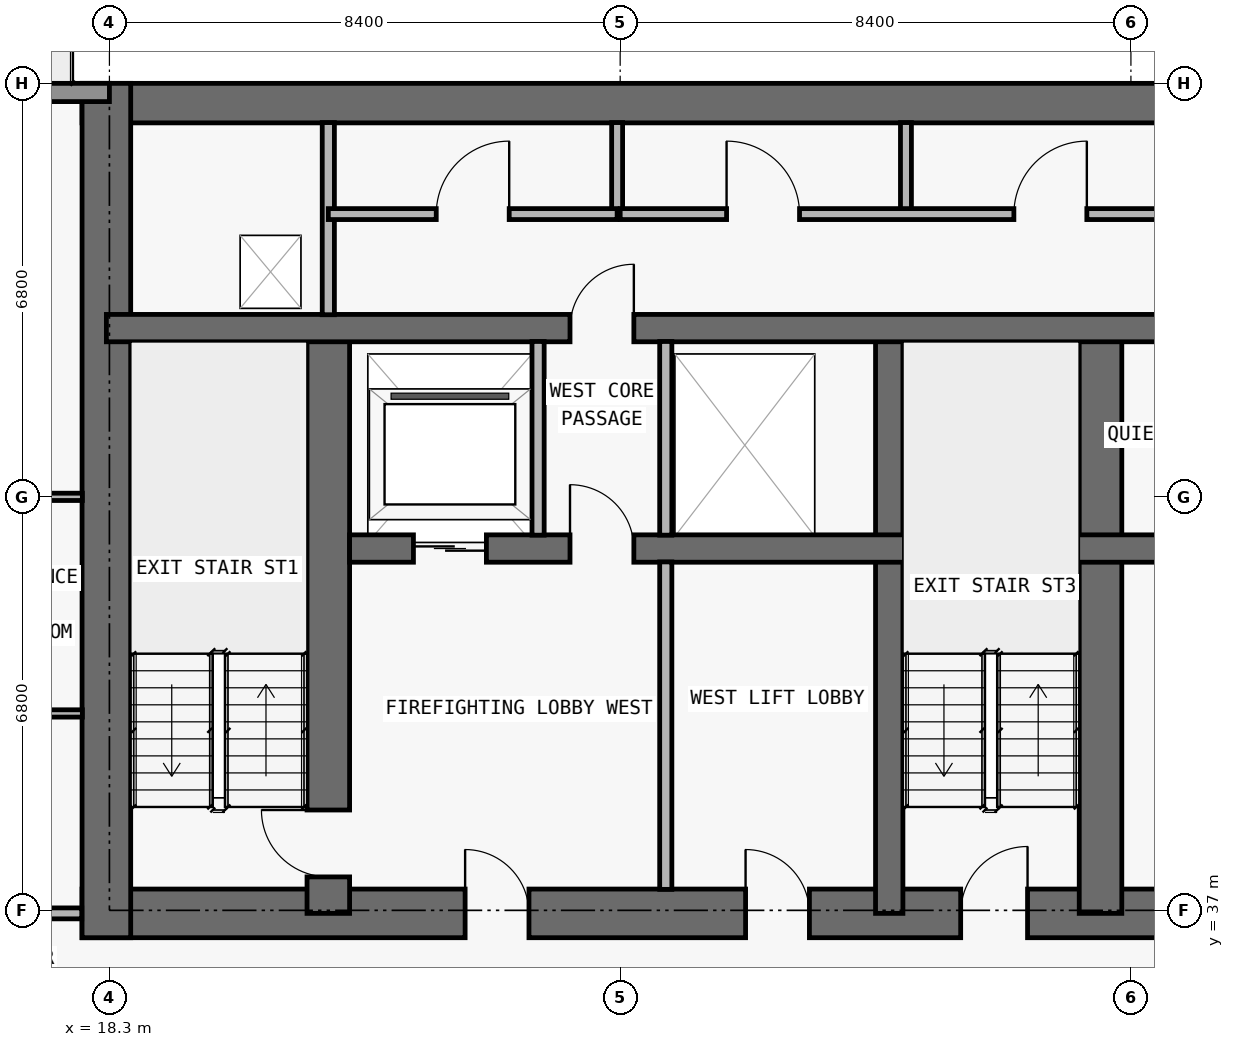
"""IFC4 building model, lengths in metres.
Left out: names, types, materials, properties, quantities, classifications, styles, units other than length and angle.
Written with IfcOpenShell. Run it as: python <this file> out.ifc"""

import sys

from ifc_helpers import new_model, si_unit, direction, frame, frame_2d, origin, place, context, subcontext, project, spatial, rectangle, extrude, element, fill, save


model = new_model("IFC4")
c1 = context("Model", 3, precision=1e-05, world=origin(), true_north=direction((0.0, 1.0)))
c2 = subcontext(c1, "Body", "Model", "MODEL_VIEW")
j1 = project(units=[si_unit("LENGTHUNIT", "METRE"), si_unit("PLANEANGLEUNIT", "RADIAN")], contexts=[c1])
p1 = place(None, origin())
s1 = spatial("IfcSite", under=j1, at=p1, CompositionType="ELEMENT")
p2 = place(p1, origin())
s2 = spatial("IfcBuilding", under=s1, at=p2, CompositionType="ELEMENT")
p3 = place(p2, frame((0.0, 0.0, 125.7)))
s3 = spatial("IfcBuildingStorey", under=s2, at=p3, CompositionType="ELEMENT", Elevation=125.7)
p4 = place(p3, frame((17.85, 36.95, 0.0), z_axis=(0.0, 0.0, 1.0), x_axis=(1.0, 0.0, 0.0)))
e1 = element("IfcWall", 1, at=p4, inside=s3, PredefinedType="SHEAR", context=c2, shape_type="SweptSolid", body=[
    extrude(rectangle(XDim=42.1, YDim=0.8, at=frame_2d((21.05, 0.0))), origin(), (0.0, 0.0, 1.0), 3.05),
])
p5 = place(p4, frame((14.45, 0.0, 0.0)))
e2 = element("IfcOpeningElement", 2, at=p5, cuts=e1, PredefinedType="OPENING", context=c2, shape_type="SweptSolid", body=[
    extrude(rectangle(XDim=1.1, YDim=2.15, at=frame_2d((0.55, 1.075))), frame((0.0, 0.41, 0.0), z_axis=(0.0, -1.0, 0.0), x_axis=(1.0, 0.0, 0.0)), (0.0, 0.0, 1.0), 0.82),
])
p6 = place(p4, frame((6.3, 0.0, 0.0)))
e3 = element("IfcOpeningElement", 3, at=p6, cuts=e1, PredefinedType="OPENING", context=c2, shape_type="SweptSolid", body=[
    extrude(rectangle(XDim=1.05, YDim=2.15, at=frame_2d((0.525, 1.075))), frame((0.0, 0.41, 0.0), z_axis=(0.0, -1.0, 0.0), x_axis=(1.0, 0.0, 0.0)), (0.0, 0.0, 1.0), 0.82),
])
p7 = place(p4, frame((34.8, 0.0, 0.0)))
e4 = element("IfcOpeningElement", 4, at=p7, cuts=e1, PredefinedType="OPENING", context=c2, shape_type="SweptSolid", body=[
    extrude(rectangle(XDim=1.05, YDim=2.15, at=frame_2d((0.525, 1.075))), frame((0.0, 0.41, 0.0), z_axis=(0.0, -1.0, 0.0), x_axis=(1.0, 0.0, 0.0)), (0.0, 0.0, 1.0), 0.82),
])
p8 = place(p4, frame((10.913, 0.0, 0.0)))
e5 = element("IfcOpeningElement", 5, at=p8, cuts=e1, PredefinedType="OPENING", context=c2, shape_type="SweptSolid", body=[
    extrude(rectangle(XDim=1.05, YDim=2.15, at=frame_2d((0.525, 1.075))), frame((0.0, 0.41, 0.0), z_axis=(0.0, -1.0, 0.0), x_axis=(1.0, 0.0, 0.0)), (0.0, 0.0, 1.0), 0.82),
])
p9 = place(p4, frame((24.15, 0.0, 0.0)))
e6 = element("IfcOpeningElement", 6, at=p9, cuts=e1, PredefinedType="OPENING", context=c2, shape_type="SweptSolid", body=[
    extrude(rectangle(XDim=1.05, YDim=2.15, at=frame_2d((0.525, 1.075))), frame((0.0, 0.41, 0.0), z_axis=(0.0, -1.0, 0.0), x_axis=(1.0, 0.0, 0.0)), (0.0, 0.0, 1.0), 0.82),
])
p10 = place(p3, frame((17.85, 50.275, 0.0), z_axis=(0.0, 0.0, 1.0), x_axis=(1.0, 0.0, 0.0)))
e7 = element("IfcWall", 7, at=p10, inside=s3, PredefinedType="SHEAR", context=c2, shape_type="SweptSolid", body=[
    extrude(rectangle(XDim=42.1, YDim=0.65, at=frame_2d((21.05, 0.0))), origin(), (0.0, 0.0, 1.0), 3.05),
])
p11 = place(p3, frame((18.25, 36.55, 0.0), z_axis=(0.0, 0.0, 1.0), x_axis=(0.0, 1.0, 0.0)))
e8 = element("IfcWall", 8, at=p11, inside=s3, PredefinedType="SHEAR", context=c2, shape_type="SweptSolid", body=[
    extrude(rectangle(XDim=14.05, YDim=0.8, at=frame_2d((7.025, 0.0))), origin(), (0.0, 0.0, 1.0), 3.05),
])
p12 = place(p3, frame((21.9, 36.95, 0.0), z_axis=(0.0, 0.0, 1.0), x_axis=(0.0, 1.0, 0.0)))
e9 = element("IfcWall", 9, at=p12, inside=s3, PredefinedType="SHEAR", context=c2, shape_type="SweptSolid", body=[
    extrude(rectangle(XDim=9.625, YDim=0.7, at=frame_2d((4.812, 0.0))), origin(), (0.0, 0.0, 1.0), 3.05),
])
p13 = place(p12, frame((0.6, 0.0, 0.0)))
e10 = element("IfcOpeningElement", 10, at=p13, cuts=e9, PredefinedType="OPENING", context=c2, shape_type="SweptSolid", body=[
    extrude(rectangle(XDim=1.1, YDim=2.15, at=frame_2d((0.55, 1.075))), frame((0.0, 0.36, 0.0), z_axis=(0.0, -1.0, 0.0), x_axis=(1.0, 0.0, 0.0)), (0.0, 0.0, 1.0), 0.72),
])
p14 = place(p3, frame((31.125, 36.95, 0.0), z_axis=(0.0, 0.0, 1.0), x_axis=(0.0, 1.0, 0.0)))
e11 = element("IfcWall", 11, at=p14, inside=s3, PredefinedType="SHEAR", context=c2, shape_type="SweptSolid", body=[
    extrude(rectangle(XDim=9.625, YDim=0.45, at=frame_2d((4.812, 0.0))), origin(), (0.0, 0.0, 1.0), 3.05),
])
p15 = place(p3, frame((34.6, 36.95, 0.0), z_axis=(0.0, 0.0, 1.0), x_axis=(0.0, 1.0, 0.0)))
e12 = element("IfcWall", 12, at=p15, inside=s3, PredefinedType="SHEAR", context=c2, shape_type="SweptSolid", body=[
    extrude(rectangle(XDim=9.625, YDim=0.7, at=frame_2d((4.812, 0.0))), origin(), (0.0, 0.0, 1.0), 3.05),
])
p16 = place(p3, frame((22.25, 42.95, 0.0), z_axis=(0.0, 0.0, 1.0), x_axis=(1.0, 0.0, 0.0)))
e13 = element("IfcWall", 13, at=p16, inside=s3, PredefinedType="SHEAR", context=c2, shape_type="SweptSolid", body=[
    extrude(rectangle(XDim=33.3, YDim=0.45, at=frame_2d((16.65, 0.0))), origin(), (0.0, 0.0, 1.0), 3.05),
])
p17 = place(p16, frame((1.05, 0.0, 0.0)))
e14 = element("IfcOpeningElement", 14, at=p17, cuts=e13, PredefinedType="OPENING", context=c2, shape_type="SweptSolid", body=[
    extrude(rectangle(XDim=1.2, YDim=2.2, at=frame_2d((0.6, 1.1))), frame((0.0, 0.235, 0.0), z_axis=(0.0, -1.0, 0.0), x_axis=(1.0, 0.0, 0.0)), (0.0, 0.0, 1.0), 0.47),
])
p18 = place(p16, frame((31.05, 0.0, 0.0)))
e15 = element("IfcOpeningElement", 15, at=p18, cuts=e13, PredefinedType="OPENING", context=c2, shape_type="SweptSolid", body=[
    extrude(rectangle(XDim=1.2, YDim=2.2, at=frame_2d((0.6, 1.1))), frame((0.0, 0.235, 0.0), z_axis=(0.0, -1.0, 0.0), x_axis=(1.0, 0.0, 0.0)), (0.0, 0.0, 1.0), 0.47),
])
p19 = place(p16, frame((21.4, 0.0, 0.0)))
e16 = element("IfcOpeningElement", 16, at=p19, cuts=e13, PredefinedType="OPENING", context=c2, shape_type="SweptSolid", body=[
    extrude(rectangle(XDim=1.1, YDim=2.2, at=frame_2d((0.55, 1.1))), frame((0.0, 0.235, 0.0), z_axis=(0.0, -1.0, 0.0), x_axis=(1.0, 0.0, 0.0)), (0.0, 0.0, 1.0), 0.47),
])
p20 = place(p16, frame((24.0, 0.0, 0.0)))
e17 = element("IfcOpeningElement", 17, at=p20, cuts=e13, PredefinedType="OPENING", context=c2, shape_type="SweptSolid", body=[
    extrude(rectangle(XDim=1.1, YDim=2.2, at=frame_2d((0.55, 1.1))), frame((0.0, 0.235, 0.0), z_axis=(0.0, -1.0, 0.0), x_axis=(1.0, 0.0, 0.0)), (0.0, 0.0, 1.0), 0.47),
])
p21 = place(p16, frame((3.625, 0.0, 0.0)))
e18 = element("IfcOpeningElement", 18, at=p21, cuts=e13, PredefinedType="OPENING", context=c2, shape_type="SweptSolid", body=[
    extrude(rectangle(XDim=1.05, YDim=2.15, at=frame_2d((0.525, 1.075))), frame((0.0, 0.235, 0.0), z_axis=(0.0, -1.0, 0.0), x_axis=(1.0, 0.0, 0.0)), (0.0, 0.0, 1.0), 0.47),
])
p22 = place(p16, frame((28.675, 0.0, 0.0)))
e19 = element("IfcOpeningElement", 19, at=p22, cuts=e13, PredefinedType="OPENING", context=c2, shape_type="SweptSolid", body=[
    extrude(rectangle(XDim=1.05, YDim=2.15, at=frame_2d((0.525, 1.075))), frame((0.0, 0.235, 0.0), z_axis=(0.0, -1.0, 0.0), x_axis=(1.0, 0.0, 0.0)), (0.0, 0.0, 1.0), 0.47),
])
p23 = place(p16, frame((15.975, 0.0, 0.0)))
e20 = element("IfcOpeningElement", 20, at=p23, cuts=e13, PredefinedType="OPENING", context=c2, shape_type="SweptSolid", body=[
    extrude(rectangle(XDim=1.0, YDim=2.2, at=frame_2d((0.5, 1.1))), frame((0.0, 0.235, 0.0), z_axis=(0.0, -1.0, 0.0), x_axis=(1.0, 0.0, 0.0)), (0.0, 0.0, 1.0), 0.47),
])
p24 = place(p3, frame((18.25, 46.575, 0.0), z_axis=(0.0, 0.0, 1.0), x_axis=(1.0, 0.0, 0.0)))
e21 = element("IfcWall", 21, at=p24, inside=s3, PredefinedType="SHEAR", context=c2, shape_type="SweptSolid", body=[
    extrude(rectangle(XDim=41.3, YDim=0.45, at=frame_2d((20.65, 0.0))), origin(), (0.0, 0.0, 1.0), 3.05),
])
p25 = place(p24, frame((7.625, 0.0, 0.0)))
e22 = element("IfcOpeningElement", 22, at=p25, cuts=e21, PredefinedType="OPENING", context=c2, shape_type="SweptSolid", body=[
    extrude(rectangle(XDim=1.05, YDim=2.15, at=frame_2d((0.525, 1.075))), frame((0.0, 0.235, 0.0), z_axis=(0.0, -1.0, 0.0), x_axis=(1.0, 0.0, 0.0)), (0.0, 0.0, 1.0), 0.47),
])
p26 = place(p24, frame((32.675, 0.0, 0.0)))
e23 = element("IfcOpeningElement", 23, at=p26, cuts=e21, PredefinedType="OPENING", context=c2, shape_type="SweptSolid", body=[
    extrude(rectangle(XDim=1.05, YDim=2.15, at=frame_2d((0.525, 1.075))), frame((0.0, 0.235, 0.0), z_axis=(0.0, -1.0, 0.0), x_axis=(1.0, 0.0, 0.0)), (0.0, 0.0, 1.0), 0.47),
])
p27 = place(p3, frame((7.7, 50.45, 0.0), z_axis=(0.0, 0.0, 1.0), x_axis=(1.0, 0.0, 0.0)))
e24 = element("IfcWall", 24, at=p27, inside=s3, PredefinedType="STANDARD", context=c2, shape_type="SweptSolid", body=[
    extrude(rectangle(XDim=10.6, YDim=0.3, at=frame_2d((5.3, 0.0))), origin(), (0.0, 0.0, 1.0), 3.05),
])
p28 = place(p27, frame((4.3, 0.0, 0.0)))
e25 = element("IfcOpeningElement", 25, at=p28, cuts=e24, PredefinedType="OPENING", context=c2, shape_type="SweptSolid", body=[
    extrude(rectangle(XDim=2.0, YDim=2.3, at=frame_2d((1.0, 1.15))), frame((0.0, 0.16, 0.0), z_axis=(0.0, -1.0, 0.0), x_axis=(1.0, 0.0, 0.0)), (0.0, 0.0, 1.0), 0.32),
])
p29 = place(p3, frame((21.9, 46.795, 0.0), z_axis=(0.0, 0.0, 1.0), x_axis=(0.0, 1.0, 0.0)))
e26 = element("IfcWall", 26, at=p29, inside=s3, PredefinedType="PARTITIONING", context=c2, shape_type="SweptSolid", body=[
    extrude(rectangle(XDim=3.16, YDim=0.2, at=frame_2d((1.58, 0.0))), origin(), (0.0, 0.0, 1.0), 3.05),
])
p30 = place(p3, frame((25.35, 43.17, 0.0), z_axis=(0.0, 0.0, 1.0), x_axis=(0.0, 1.0, 0.0)))
e27 = element("IfcWall", 27, at=p30, inside=s3, PredefinedType="PARTITIONING", context=c2, shape_type="SweptSolid", body=[
    extrude(rectangle(XDim=3.185, YDim=0.2, at=frame_2d((1.593, 0.0))), origin(), (0.0, 0.0, 1.0), 3.05),
])
p31 = place(p3, frame((26.65, 48.45, 0.0), z_axis=(0.0, 0.0, 1.0), x_axis=(0.0, 1.0, 0.0)))
e28 = element("IfcWall", 28, at=p31, inside=s3, PredefinedType="PARTITIONING", context=c2, shape_type="SweptSolid", body=[
    extrude(rectangle(XDim=1.505, YDim=0.18, at=frame_2d((0.752, 0.0))), origin(), (0.0, 0.0, 1.0), 3.05),
])
p32 = place(p3, frame((27.45, 37.345, 0.0), z_axis=(0.0, 0.0, 1.0), x_axis=(0.0, 1.0, 0.0)))
e29 = element("IfcWall", 29, at=p32, inside=s3, PredefinedType="PARTITIONING", context=c2, shape_type="SweptSolid", body=[
    extrude(rectangle(XDim=5.385, YDim=0.2, at=frame_2d((2.692, 0.0))), origin(), (0.0, 0.0, 1.0), 3.05),
])
p33 = place(p3, frame((27.45, 43.17, 0.0), z_axis=(0.0, 0.0, 1.0), x_axis=(0.0, 1.0, 0.0)))
e30 = element("IfcWall", 30, at=p33, inside=s3, PredefinedType="PARTITIONING", context=c2, shape_type="SweptSolid", body=[
    extrude(rectangle(XDim=3.185, YDim=0.2, at=frame_2d((1.593, 0.0))), origin(), (0.0, 0.0, 1.0), 3.05),
])
p34 = place(p3, frame((31.4, 48.45, 0.0), z_axis=(0.0, 0.0, 1.0), x_axis=(0.0, 1.0, 0.0)))
e31 = element("IfcWall", 31, at=p34, inside=s3, PredefinedType="PARTITIONING", context=c2, shape_type="SweptSolid", body=[
    extrude(rectangle(XDim=1.505, YDim=0.18, at=frame_2d((0.752, 0.0))), origin(), (0.0, 0.0, 1.0), 3.05),
])
p35 = place(p3, frame((7.7, 36.95, 0.0), z_axis=(0.0, 0.0, 1.0), x_axis=(1.0, 0.0, 0.0)))
e32 = element("IfcWall", 32, at=p35, inside=s3, PredefinedType="PARTITIONING", context=c2, shape_type="SweptSolid", body=[
    extrude(rectangle(XDim=10.145, YDim=0.18, at=frame_2d((5.073, 0.0))), origin(), (0.0, 0.0, 1.0), 3.05),
])
p36 = place(p35, frame((5.188, 0.0, 0.0)))
e33 = element("IfcOpeningElement", 33, at=p36, cuts=e32, PredefinedType="OPENING", context=c2, shape_type="SweptSolid", body=[
    extrude(rectangle(XDim=1.0, YDim=2.2, at=frame_2d((0.5, 1.1))), frame((0.0, 0.1, 0.0), z_axis=(0.0, -1.0, 0.0), x_axis=(1.0, 0.0, 0.0)), (0.0, 0.0, 1.0), 0.2),
])
p37 = place(p3, frame((15.6, 40.238, 0.0), z_axis=(0.0, 0.0, 1.0), x_axis=(1.0, 0.0, 0.0)))
e34 = element("IfcWall", 34, at=p37, inside=s3, PredefinedType="PARTITIONING", context=c2, shape_type="SweptSolid", body=[
    extrude(rectangle(XDim=2.255, YDim=0.12, at=frame_2d((1.127, 0.0))), origin(), (0.0, 0.0, 1.0), 3.05),
])
p38 = place(p3, frame((4.195, 43.8, 0.0), z_axis=(0.0, 0.0, 1.0), x_axis=(1.0, 0.0, 0.0)))
e35 = element("IfcWall", 35, at=p38, inside=s3, PredefinedType="PARTITIONING", context=c2, shape_type="SweptSolid", body=[
    extrude(rectangle(XDim=13.66, YDim=0.12, at=frame_2d((6.83, 0.0))), origin(), (0.0, 0.0, 1.0), 2.339),
])
p39 = place(p38, frame((8.743, 0.0, 0.0)))
e36 = element("IfcOpeningElement", 36, at=p39, cuts=e35, PredefinedType="OPENING", context=c2, shape_type="SweptSolid", body=[
    extrude(rectangle(XDim=0.9, YDim=2.15, at=frame_2d((0.45, 1.075))), frame((0.0, 0.07, 0.0), z_axis=(0.0, -1.0, 0.0), x_axis=(1.0, 0.0, 0.0)), (0.0, 0.0, 1.0), 0.14),
])
p40 = place(p38, frame((12.107, 0.0, 0.0)))
e37 = element("IfcOpeningElement", 37, at=p40, cuts=e35, PredefinedType="OPENING", context=c2, shape_type="SweptSolid", body=[
    extrude(rectangle(XDim=0.85, YDim=2.1, at=frame_2d((0.425, 1.05))), frame((0.0, 0.07, 0.0), z_axis=(0.0, -1.0, 0.0), x_axis=(1.0, 0.0, 0.0)), (0.0, 0.0, 1.0), 0.14),
])
p41 = place(p3, frame((21.9, 48.45, 0.0), z_axis=(0.0, 0.0, 1.0), x_axis=(1.0, 0.0, 0.0)))
e38 = element("IfcWall", 38, at=p41, inside=s3, PredefinedType="PARTITIONING", context=c2, shape_type="SweptSolid", body=[
    extrude(rectangle(XDim=4.75, YDim=0.18, at=frame_2d((2.375, 0.0))), origin(), (0.0, 0.0, 1.0), 3.05),
])
p42 = place(p41, frame((1.775, 0.0, 0.0)))
e39 = element("IfcOpeningElement", 39, at=p42, cuts=e38, PredefinedType="OPENING", context=c2, shape_type="SweptSolid", body=[
    extrude(rectangle(XDim=1.2, YDim=2.2, at=frame_2d((0.6, 1.1))), frame((0.0, 0.1, 0.0), z_axis=(0.0, -1.0, 0.0), x_axis=(1.0, 0.0, 0.0)), (0.0, 0.0, 1.0), 0.2),
])
p43 = place(p3, frame((26.7, 48.45, 0.0), z_axis=(0.0, 0.0, 1.0), x_axis=(1.0, 0.0, 0.0)))
e40 = element("IfcWall", 40, at=p43, inside=s3, PredefinedType="PARTITIONING", context=c2, shape_type="SweptSolid", body=[
    extrude(rectangle(XDim=29.2, YDim=0.18, at=frame_2d((14.6, 0.0))), origin(), (0.0, 0.0, 1.0), 3.05),
])
p44 = place(p43, frame((1.75, 0.0, 0.0)))
e41 = element("IfcOpeningElement", 41, at=p44, cuts=e40, PredefinedType="OPENING", context=c2, shape_type="SweptSolid", body=[
    extrude(rectangle(XDim=1.2, YDim=2.2, at=frame_2d((0.6, 1.1))), frame((0.0, 0.1, 0.0), z_axis=(0.0, -1.0, 0.0), x_axis=(1.0, 0.0, 0.0)), (0.0, 0.0, 1.0), 0.2),
])
p45 = place(p43, frame((6.475, 0.0, 0.0)))
e42 = element("IfcOpeningElement", 42, at=p45, cuts=e40, PredefinedType="OPENING", context=c2, shape_type="SweptSolid", body=[
    extrude(rectangle(XDim=1.2, YDim=2.2, at=frame_2d((0.6, 1.1))), frame((0.0, 0.1, 0.0), z_axis=(0.0, -1.0, 0.0), x_axis=(1.0, 0.0, 0.0)), (0.0, 0.0, 1.0), 0.2),
])
p46 = place(p43, frame((14.05, 0.0, 0.0)))
e43 = element("IfcOpeningElement", 43, at=p46, cuts=e40, PredefinedType="OPENING", context=c2, shape_type="SweptSolid", body=[
    extrude(rectangle(XDim=1.0, YDim=2.2, at=frame_2d((0.5, 1.1))), frame((0.0, 0.1, 0.0), z_axis=(0.0, -1.0, 0.0), x_axis=(1.0, 0.0, 0.0)), (0.0, 0.0, 1.0), 0.2),
])
p47 = place(p43, frame((21.425, 0.0, 0.0)))
e44 = element("IfcOpeningElement", 44, at=p47, cuts=e40, PredefinedType="OPENING", context=c2, shape_type="SweptSolid", body=[
    extrude(rectangle(XDim=1.2, YDim=2.2, at=frame_2d((0.6, 1.1))), frame((0.0, 0.1, 0.0), z_axis=(0.0, -1.0, 0.0), x_axis=(1.0, 0.0, 0.0)), (0.0, 0.0, 1.0), 0.2),
])
p48 = place(p43, frame((26.375, 0.0, 0.0)))
e45 = element("IfcOpeningElement", 45, at=p48, cuts=e40, PredefinedType="OPENING", context=c2, shape_type="SweptSolid", body=[
    extrude(rectangle(XDim=0.85, YDim=2.1, at=frame_2d((0.425, 1.05))), frame((0.0, 0.1, 0.0), z_axis=(0.0, -1.0, 0.0), x_axis=(1.0, 0.0, 0.0)), (0.0, 0.0, 1.0), 0.2),
])
p49 = place(p17, origin())
e46 = element("IfcDoor", 46, at=p49, inside=s3, OperationType="DOUBLE_DOOR_SLIDING", PredefinedType="DOOR", context=c2, shape_type="SweptSolid", body=[
    extrude(rectangle(XDim=1.2, YDim=2.2, at=frame_2d((0.6, 1.1))), frame((0.0, 0.025, 0.0), z_axis=(0.0, -1.0, 0.0), x_axis=(1.0, 0.0, 0.0)), (0.0, 0.0, 1.0), 0.05),
])
fill(e14, e46)
p50 = place(p5, origin())
e47 = element("IfcDoor", 47, at=p50, inside=s3, OperationType="SINGLE_SWING_RIGHT", PredefinedType="DOOR", context=c2, shape_type="SweptSolid", body=[
    extrude(rectangle(XDim=1.1, YDim=2.15, at=frame_2d((0.55, 1.075))), frame((0.0, 0.025, 0.0), z_axis=(0.0, -1.0, 0.0), x_axis=(1.0, 0.0, 0.0)), (0.0, 0.0, 1.0), 0.05),
])
fill(e2, e47)
p51 = place(p6, origin())
e48 = element("IfcDoor", 48, at=p51, inside=s3, OperationType="SINGLE_SWING_LEFT", PredefinedType="DOOR", context=c2, shape_type="SweptSolid", body=[
    extrude(rectangle(XDim=1.05, YDim=2.15, at=frame_2d((0.525, 1.075))), frame((0.0, 0.025, 0.0), z_axis=(0.0, -1.0, 0.0), x_axis=(1.0, 0.0, 0.0)), (0.0, 0.0, 1.0), 0.05),
])
fill(e3, e48)
p52 = place(p13, origin())
e49 = element("IfcDoor", 49, at=p52, inside=s3, OperationType="SINGLE_SWING_RIGHT", PredefinedType="DOOR", context=c2, shape_type="SweptSolid", body=[
    extrude(rectangle(XDim=1.1, YDim=2.15, at=frame_2d((0.55, 1.075))), frame((0.0, 0.025, 0.0), z_axis=(0.0, -1.0, 0.0), x_axis=(1.0, 0.0, 0.0)), (0.0, 0.0, 1.0), 0.05),
])
fill(e10, e49)
p53 = place(p21, origin())
e50 = element("IfcDoor", 50, at=p53, inside=s3, OperationType="SINGLE_SWING_LEFT", PredefinedType="DOOR", context=c2, shape_type="SweptSolid", body=[
    extrude(rectangle(XDim=1.05, YDim=2.15, at=frame_2d((0.525, 1.075))), frame((0.0, 0.025, 0.0), z_axis=(0.0, -1.0, 0.0), x_axis=(1.0, 0.0, 0.0)), (0.0, 0.0, 1.0), 0.05),
])
fill(e18, e50)
p54 = place(p8, origin())
e51 = element("IfcDoor", 51, at=p54, inside=s3, OperationType="SINGLE_SWING_LEFT", PredefinedType="DOOR", context=c2, shape_type="SweptSolid", body=[
    extrude(rectangle(XDim=1.05, YDim=2.15, at=frame_2d((0.525, 1.075))), frame((0.0, 0.025, 0.0), z_axis=(0.0, -1.0, 0.0), x_axis=(1.0, 0.0, 0.0)), (0.0, 0.0, 1.0), 0.05),
])
fill(e5, e51)
p55 = place(p25, origin())
e52 = element("IfcDoor", 52, at=p55, inside=s3, OperationType="SINGLE_SWING_RIGHT", PredefinedType="DOOR", context=c2, shape_type="SweptSolid", body=[
    extrude(rectangle(XDim=1.05, YDim=2.15, at=frame_2d((0.525, 1.075))), frame((0.0, 0.025, 0.0), z_axis=(0.0, -1.0, 0.0), x_axis=(1.0, 0.0, 0.0)), (0.0, 0.0, 1.0), 0.05),
])
fill(e22, e52)
p56 = place(p42, origin())
e53 = element("IfcDoor", 53, at=p56, inside=s3, OperationType="SINGLE_SWING_RIGHT", PredefinedType="DOOR", context=c2, shape_type="SweptSolid", body=[
    extrude(rectangle(XDim=1.2, YDim=2.2, at=frame_2d((0.6, 1.1))), frame((0.0, 0.025, 0.0), z_axis=(0.0, -1.0, 0.0), x_axis=(1.0, 0.0, 0.0)), (0.0, 0.0, 1.0), 0.05),
])
fill(e39, e53)
p57 = place(p44, origin())
e54 = element("IfcDoor", 54, at=p57, inside=s3, OperationType="SINGLE_SWING_LEFT", PredefinedType="DOOR", context=c2, shape_type="SweptSolid", body=[
    extrude(rectangle(XDim=1.2, YDim=2.2, at=frame_2d((0.6, 1.1))), frame((0.0, 0.025, 0.0), z_axis=(0.0, -1.0, 0.0), x_axis=(1.0, 0.0, 0.0)), (0.0, 0.0, 1.0), 0.05),
])
fill(e41, e54)
p58 = place(p45, origin())
e55 = element("IfcDoor", 55, at=p58, inside=s3, OperationType="SINGLE_SWING_RIGHT", PredefinedType="DOOR", context=c2, shape_type="SweptSolid", body=[
    extrude(rectangle(XDim=1.2, YDim=2.2, at=frame_2d((0.6, 1.1))), frame((0.0, 0.025, 0.0), z_axis=(0.0, -1.0, 0.0), x_axis=(1.0, 0.0, 0.0)), (0.0, 0.0, 1.0), 0.05),
])
fill(e42, e55)
save(model, sys.argv[1])
